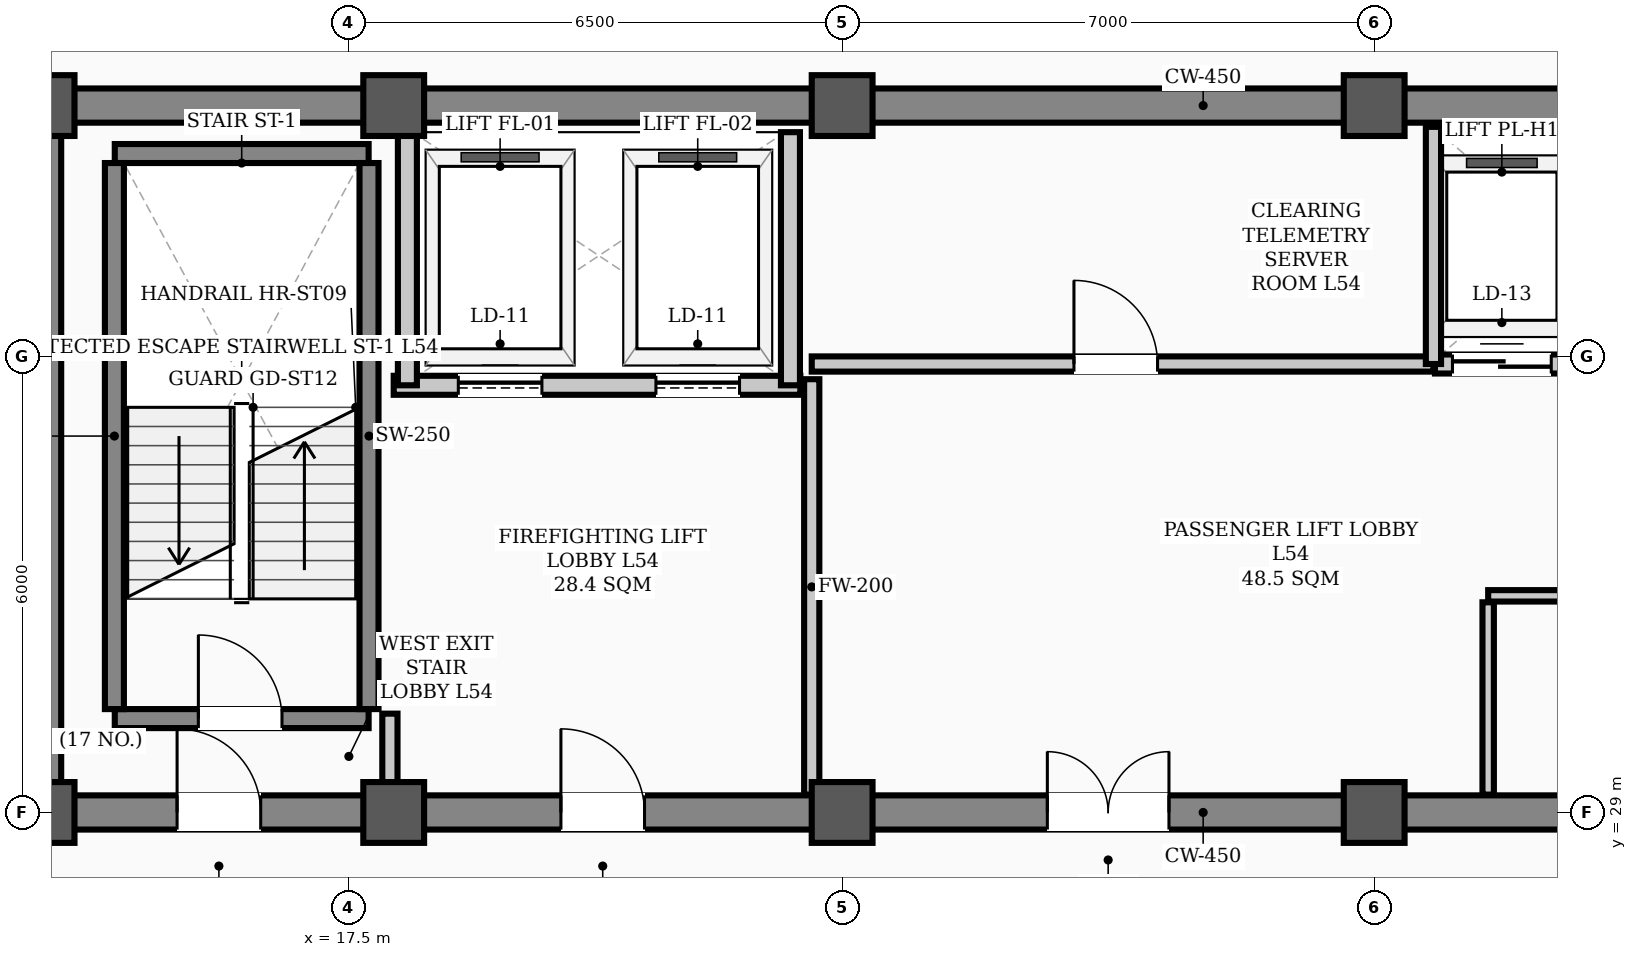
"""IFC4 building model, lengths in metres.
Left out: names, types, materials, properties, quantities, classifications, styles, units other than length and angle.
Written with IfcOpenShell. Run it as: python <this file> out.ifc"""

import sys

from ifc_helpers import new_model, si_unit, direction, frame, frame_2d, origin, origin_2d, place, context, subcontext, project, spatial, rectangle, hollow_rectangle, extrude, element, fill, save


model = new_model("IFC4")
c1 = context("Model", 3, precision=1e-05, world=origin(), true_north=direction((0.0, 1.0)))
c2 = subcontext(c1, "Body", "Model", "MODEL_VIEW")
j1 = project(units=[si_unit("LENGTHUNIT", "METRE"), si_unit("PLANEANGLEUNIT", "RADIAN")], contexts=[c1])
p1 = place(None, origin())
s1 = spatial("IfcSite", under=j1, at=p1, CompositionType="ELEMENT")
p2 = place(p1, origin())
s2 = spatial("IfcBuilding", under=s1, at=p2, CompositionType="ELEMENT")
p3 = place(p2, frame((0.0, 0.0, 218.9)))
s3 = spatial("IfcBuildingStorey", under=s2, at=p3, CompositionType="ELEMENT", Elevation=218.9)
for number, where, z_axis, x_axis in (
    (1, (13.5, 29.0, 0.0), (0.0, 0.0, 1.0), (1.0, 0.0, 0.0)),
    (2, (13.5, 38.3, 0.0), (0.0, 0.0, 1.0), (1.0, 0.0, 0.0)),
    (3, (18.1, 29.0, 0.0), (0.0, 0.0, 1.0), (1.0, 0.0, 0.0)),
    (4, (18.1, 38.3, 0.0), (0.0, 0.0, 1.0), (1.0, 0.0, 0.0)),
    (5, (24.0, 29.0, 0.0), (0.0, 0.0, 1.0), (1.0, 0.0, 0.0)),
    (6, (24.0, 38.3, 0.0), (0.0, 0.0, 1.0), (1.0, 0.0, 0.0)),
    (7, (31.0, 29.0, 0.0), (0.0, 0.0, 1.0), (1.0, 0.0, 0.0)),
    (8, (31.0, 38.3, 0.0), (0.0, 0.0, 1.0), (1.0, 0.0, 0.0)),
):
    element("IfcColumn", number, at=place(p3, frame(where, z_axis=z_axis, x_axis=x_axis)), inside=s3, PredefinedType="COLUMN", context=c2, shape_type="SweptSolid", body=[
        extrude(hollow_rectangle(XDim=0.8, YDim=0.8, WallThickness=0.032, InnerFilletRadius=0.016, OuterFilletRadius=0.048, at=origin_2d()), origin(), (0.0, 0.0, 1.0), 3.9),
    ])
p4 = place(p3, frame((13.5, 29.0, 0.0), z_axis=(0.0, 0.0, 1.0), x_axis=(1.0, 0.0, 0.0)))
e9 = element("IfcWall", 9, at=p4, inside=s3, PredefinedType="SHEAR", context=c2, shape_type="SweptSolid", body=[
    extrude(rectangle(XDim=30.5, YDim=0.45, at=frame_2d((15.25, 0.0))), origin(), (0.0, 0.0, 1.0), 3.72),
])
p5 = place(p4, frame((1.75, 0.0, 0.0)))
e10 = element("IfcOpeningElement", 10, at=p5, cuts=e9, PredefinedType="OPENING", context=c2, shape_type="SweptSolid", body=[
    extrude(rectangle(XDim=1.1, YDim=2.08, at=frame_2d((0.55, 1.04))), frame((0.0, 0.235, 0.0), z_axis=(0.0, -1.0, 0.0), x_axis=(1.0, 0.0, 0.0)), (0.0, 0.0, 1.0), 0.47),
])
p6 = place(p4, frame((26.7, 0.0, 0.0)))
e11 = element("IfcOpeningElement", 11, at=p6, cuts=e9, PredefinedType="OPENING", context=c2, shape_type="SweptSolid", body=[
    extrude(rectangle(XDim=1.1, YDim=2.08, at=frame_2d((0.55, 1.04))), frame((0.0, 0.235, 0.0), z_axis=(0.0, -1.0, 0.0), x_axis=(1.0, 0.0, 0.0)), (0.0, 0.0, 1.0), 0.47),
])
p7 = place(p4, frame((6.8, 0.0, 0.0)))
e12 = element("IfcOpeningElement", 12, at=p7, cuts=e9, PredefinedType="OPENING", context=c2, shape_type="SweptSolid", body=[
    extrude(rectangle(XDim=1.1, YDim=2.08, at=frame_2d((0.55, 1.04))), frame((0.0, 0.235, 0.0), z_axis=(0.0, -1.0, 0.0), x_axis=(1.0, 0.0, 0.0)), (0.0, 0.0, 1.0), 0.47),
])
p8 = place(p4, frame((13.2, 0.0, 0.0)))
e13 = element("IfcOpeningElement", 13, at=p8, cuts=e9, PredefinedType="OPENING", context=c2, shape_type="SweptSolid", body=[
    extrude(rectangle(XDim=1.6, YDim=2.08, at=frame_2d((0.8, 1.04))), frame((0.0, 0.235, 0.0), z_axis=(0.0, -1.0, 0.0), x_axis=(1.0, 0.0, 0.0)), (0.0, 0.0, 1.0), 0.47),
])
p9 = place(p4, frame((20.525, 0.0, 0.0)))
e14 = element("IfcOpeningElement", 14, at=p9, cuts=e9, PredefinedType="OPENING", context=c2, shape_type="SweptSolid", body=[
    extrude(rectangle(XDim=0.95, YDim=2.08, at=frame_2d((0.475, 1.04))), frame((0.0, 0.235, 0.0), z_axis=(0.0, -1.0, 0.0), x_axis=(1.0, 0.0, 0.0)), (0.0, 0.0, 1.0), 0.47),
])
p10 = place(p3, frame((13.5, 38.3, 0.0), z_axis=(0.0, 0.0, 1.0), x_axis=(1.0, 0.0, 0.0)))
e15 = element("IfcWall", 15, at=p10, inside=s3, PredefinedType="SHEAR", context=c2, shape_type="SweptSolid", body=[
    extrude(rectangle(XDim=30.5, YDim=0.45, at=frame_2d((15.25, 0.0))), origin(), (0.0, 0.0, 1.0), 3.72),
])
p11 = place(p3, frame((13.5, 29.35, 0.0), z_axis=(0.0, 0.0, 1.0), x_axis=(0.0, 1.0, 0.0)))
e16 = element("IfcWall", 16, at=p11, inside=s3, PredefinedType="SHEAR", context=c2, shape_type="SweptSolid", body=[
    extrude(rectangle(XDim=8.6, YDim=0.45, at=frame_2d((4.3, 0.0))), origin(), (0.0, 0.0, 1.0), 3.72),
])
p12 = place(p3, frame((14.43, 30.235, 0.0), z_axis=(0.0, 0.0, 1.0), x_axis=(1.0, 0.0, 0.0)))
e17 = element("IfcWall", 17, at=p12, inside=s3, PredefinedType="STANDARD", context=c2, shape_type="SweptSolid", body=[
    extrude(rectangle(XDim=3.34, YDim=0.25, at=frame_2d((1.67, 0.0))), origin(), (0.0, 0.0, 1.0), 3.72),
])
p13 = place(p12, frame((1.1, 0.0, 0.0)))
e18 = element("IfcOpeningElement", 18, at=p13, cuts=e17, PredefinedType="OPENING", context=c2, shape_type="SweptSolid", body=[
    extrude(rectangle(XDim=1.1, YDim=2.08, at=frame_2d((0.55, 1.04))), frame((0.0, 0.135, 0.0), z_axis=(0.0, -1.0, 0.0), x_axis=(1.0, 0.0, 0.0)), (0.0, 0.0, 1.0), 0.27),
])
p14 = place(p3, frame((14.43, 37.669, 0.0), z_axis=(0.0, 0.0, 1.0), x_axis=(1.0, 0.0, 0.0)))
e19 = element("IfcWall", 19, at=p14, inside=s3, PredefinedType="STANDARD", context=c2, shape_type="SweptSolid", body=[
    extrude(rectangle(XDim=3.34, YDim=0.25, at=frame_2d((1.67, 0.0))), origin(), (0.0, 0.0, 1.0), 3.72),
])
for number, where, z_axis, x_axis in (
    (20, (14.425, 30.36, 0.0), (0.0, 0.0, 1.0), (0.0, 1.0, 0.0)),
    (21, (17.775, 30.36, 0.0), (0.0, 0.0, 1.0), (0.0, 1.0, 0.0)),
):
    element("IfcWall", number, at=place(p3, frame(where, z_axis=z_axis, x_axis=x_axis)), inside=s3, PredefinedType="STANDARD", context=c2, shape_type="SweptSolid", body=[
        extrude(rectangle(XDim=7.184, YDim=0.25, at=frame_2d((3.592, 0.0))), origin(), (0.0, 0.0, 1.0), 3.72),
    ])
p15 = place(p3, frame((18.1, 34.62, 0.0), z_axis=(0.0, 0.0, 1.0), x_axis=(1.0, 0.0, 0.0)))
e22 = element("IfcWall", 22, at=p15, inside=s3, PredefinedType="STANDARD", context=c2, shape_type="SweptSolid", body=[
    extrude(rectangle(XDim=5.35, YDim=0.25, at=frame_2d((2.675, 0.0))), origin(), (0.0, 0.0, 1.0), 3.72),
])
p16 = place(p15, frame((0.85, 0.0, 0.0)))
e23 = element("IfcOpeningElement", 23, at=p16, cuts=e22, PredefinedType="OPENING", context=c2, shape_type="SweptSolid", body=[
    extrude(rectangle(XDim=1.1, YDim=2.08, at=frame_2d((0.55, 1.04))), frame((0.0, 0.135, 0.0), z_axis=(0.0, -1.0, 0.0), x_axis=(1.0, 0.0, 0.0)), (0.0, 0.0, 1.0), 0.27),
])
p17 = place(p15, frame((3.45, 0.0, 0.0)))
e24 = element("IfcOpeningElement", 24, at=p17, cuts=e22, PredefinedType="OPENING", context=c2, shape_type="SweptSolid", body=[
    extrude(rectangle(XDim=1.1, YDim=2.08, at=frame_2d((0.55, 1.04))), frame((0.0, 0.135, 0.0), z_axis=(0.0, -1.0, 0.0), x_axis=(1.0, 0.0, 0.0)), (0.0, 0.0, 1.0), 0.27),
])
for number, where, z_axis, x_axis in (
    (25, (18.28, 34.62, 0.0), (0.0, 0.0, 1.0), (0.0, 1.0, 0.0)),
    (26, (23.32, 34.62, 0.0), (0.0, 0.0, 1.0), (0.0, 1.0, 0.0)),
):
    element("IfcWall", number, at=place(p3, frame(where, z_axis=z_axis, x_axis=x_axis)), inside=s3, PredefinedType="STANDARD", context=c2, shape_type="SweptSolid", body=[
        extrude(rectangle(XDim=3.33, YDim=0.25, at=frame_2d((1.665, 0.0))), origin(), (0.0, 0.0, 1.0), 3.72),
    ])
p18 = place(p3, frame((31.8, 34.9, 0.0), z_axis=(0.0, 0.0, 1.0), x_axis=(1.0, 0.0, 0.0)))
e27 = element("IfcWall", 27, at=p18, inside=s3, PredefinedType="STANDARD", context=c2, shape_type="SweptSolid", body=[
    extrude(rectangle(XDim=3.6, YDim=0.25, at=frame_2d((1.8, 0.0))), origin(), (0.0, 0.0, 1.0), 3.72),
])
p19 = place(p18, frame((0.23, 0.0, 0.0)))
e28 = element("IfcOpeningElement", 28, at=p19, cuts=e27, PredefinedType="OPENING", context=c2, shape_type="SweptSolid", body=[
    extrude(rectangle(XDim=1.3, YDim=2.08, at=frame_2d((0.65, 1.04))), frame((0.0, 0.135, 0.0), z_axis=(0.0, -1.0, 0.0), x_axis=(1.0, 0.0, 0.0)), (0.0, 0.0, 1.0), 0.27),
])
p20 = place(p18, frame((2.03, 0.0, 0.0)))
e29 = element("IfcOpeningElement", 29, at=p20, cuts=e27, PredefinedType="OPENING", context=c2, shape_type="SweptSolid", body=[
    extrude(rectangle(XDim=1.3, YDim=2.08, at=frame_2d((0.65, 1.04))), frame((0.0, 0.135, 0.0), z_axis=(0.0, -1.0, 0.0), x_axis=(1.0, 0.0, 0.0)), (0.0, 0.0, 1.0), 0.27),
])
p21 = place(p3, frame((23.6, 34.9, 0.0), z_axis=(0.0, 0.0, 1.0), x_axis=(1.0, 0.0, 0.0)))
e30 = element("IfcWall", 30, at=p21, inside=s3, PredefinedType="STANDARD", context=c2, shape_type="SweptSolid", body=[
    extrude(rectangle(XDim=8.18, YDim=0.2, at=frame_2d((4.09, 0.0))), origin(), (0.0, 0.0, 1.0), 3.72),
])
p22 = place(p21, frame((3.45, 0.0, 0.0)))
e31 = element("IfcOpeningElement", 31, at=p22, cuts=e30, PredefinedType="OPENING", context=c2, shape_type="SweptSolid", body=[
    extrude(rectangle(XDim=1.1, YDim=2.08, at=frame_2d((0.55, 1.04))), frame((0.0, 0.11, 0.0), z_axis=(0.0, -1.0, 0.0), x_axis=(1.0, 0.0, 0.0)), (0.0, 0.0, 1.0), 0.22),
])
p23 = place(p3, frame((32.5, 31.85, 0.0), z_axis=(0.0, 0.0, 1.0), x_axis=(1.0, 0.0, 0.0)))
e32 = element("IfcWall", 32, at=p23, inside=s3, PredefinedType="PARTITIONING", context=c2, shape_type="SweptSolid", body=[
    extrude(rectangle(XDim=4.1, YDim=0.15, at=frame_2d((2.05, 0.0))), origin(), (0.0, 0.0, 1.0), 3.72),
])
p24 = place(p3, frame((18.05, 29.235, 0.0), z_axis=(0.0, 0.0, 1.0), x_axis=(0.0, 1.0, 0.0)))
e33 = element("IfcWall", 33, at=p24, inside=s3, PredefinedType="STANDARD", context=c2, shape_type="SweptSolid", body=[
    extrude(rectangle(XDim=1.065, YDim=0.2, at=frame_2d((0.532, 0.0))), origin(), (0.0, 0.0, 1.0), 3.35),
])
p25 = place(p3, frame((23.6, 29.235, 0.0), z_axis=(0.0, 0.0, 1.0), x_axis=(0.0, 1.0, 0.0)))
e34 = element("IfcWall", 34, at=p25, inside=s3, PredefinedType="STANDARD", context=c2, shape_type="SweptSolid", body=[
    extrude(rectangle(XDim=5.465, YDim=0.2, at=frame_2d((2.732, 0.0))), origin(), (0.0, 0.0, 1.0), 3.2),
])
p26 = place(p3, frame((32.5, 29.235, 0.0), z_axis=(0.0, 0.0, 1.0), x_axis=(0.0, 1.0, 0.0)))
e35 = element("IfcWall", 35, at=p26, inside=s3, PredefinedType="PARTITIONING", context=c2, shape_type="SweptSolid", body=[
    extrude(rectangle(XDim=2.53, YDim=0.15, at=frame_2d((1.265, 0.0))), origin(), (0.0, 0.0, 1.0), 3.35),
])
p27 = place(p3, frame((31.78, 34.9, 0.0), z_axis=(0.0, 0.0, 1.0), x_axis=(0.0, 1.0, 0.0)))
e36 = element("IfcWall", 36, at=p27, inside=s3, PredefinedType="STANDARD", context=c2, shape_type="SweptSolid", body=[
    extrude(rectangle(XDim=3.12, YDim=0.2, at=frame_2d((1.56, 0.0))), origin(), (0.0, 0.0, 1.0), 3.72),
])
p28 = place(p13, origin())
e37 = element("IfcDoor", 37, at=p28, inside=s3, OperationType="SINGLE_SWING_LEFT", PredefinedType="DOOR", context=c2, shape_type="SweptSolid", body=[
    extrude(rectangle(XDim=1.1, YDim=2.08, at=frame_2d((0.55, 1.04))), frame((0.0, 0.025, 0.0), z_axis=(0.0, -1.0, 0.0), x_axis=(1.0, 0.0, 0.0)), (0.0, 0.0, 1.0), 0.05),
])
fill(e18, e37)
p29 = place(p5, origin())
e38 = element("IfcDoor", 38, at=p29, inside=s3, OperationType="SINGLE_SWING_LEFT", PredefinedType="DOOR", context=c2, shape_type="SweptSolid", body=[
    extrude(rectangle(XDim=1.1, YDim=2.08, at=frame_2d((0.55, 1.04))), frame((0.0, 0.025, 0.0), z_axis=(0.0, -1.0, 0.0), x_axis=(1.0, 0.0, 0.0)), (0.0, 0.0, 1.0), 0.05),
])
fill(e10, e38)
p30 = place(p7, origin())
e39 = element("IfcDoor", 39, at=p30, inside=s3, OperationType="SINGLE_SWING_LEFT", PredefinedType="DOOR", context=c2, shape_type="SweptSolid", body=[
    extrude(rectangle(XDim=1.1, YDim=2.08, at=frame_2d((0.55, 1.04))), frame((0.0, 0.025, 0.0), z_axis=(0.0, -1.0, 0.0), x_axis=(1.0, 0.0, 0.0)), (0.0, 0.0, 1.0), 0.05),
])
fill(e12, e39)
p31 = place(p8, origin())
e40 = element("IfcDoor", 40, at=p31, inside=s3, OperationType="DOUBLE_DOOR_SINGLE_SWING", PredefinedType="DOOR", context=c2, shape_type="SweptSolid", body=[
    extrude(rectangle(XDim=1.6, YDim=2.08, at=frame_2d((0.8, 1.04))), frame((0.0, 0.025, 0.0), z_axis=(0.0, -1.0, 0.0), x_axis=(1.0, 0.0, 0.0)), (0.0, 0.0, 1.0), 0.05),
])
fill(e13, e40)
p32 = place(p22, origin())
e41 = element("IfcDoor", 41, at=p32, inside=s3, OperationType="SINGLE_SWING_LEFT", PredefinedType="DOOR", context=c2, shape_type="SweptSolid", body=[
    extrude(rectangle(XDim=1.1, YDim=2.08, at=frame_2d((0.55, 1.04))), frame((0.0, 0.025, 0.0), z_axis=(0.0, -1.0, 0.0), x_axis=(1.0, 0.0, 0.0)), (0.0, 0.0, 1.0), 0.05),
])
fill(e31, e41)
p33 = place(p16, origin())
e42 = element("IfcDoor", 42, at=p33, inside=s3, OperationType="SLIDING_TO_LEFT", PredefinedType="DOOR", context=c2, shape_type="SweptSolid", body=[
    extrude(rectangle(XDim=1.1, YDim=2.08, at=frame_2d((0.55, 1.04))), frame((0.0, 0.025, 0.0), z_axis=(0.0, -1.0, 0.0), x_axis=(1.0, 0.0, 0.0)), (0.0, 0.0, 1.0), 0.05),
])
fill(e23, e42)
p34 = place(p17, origin())
e43 = element("IfcDoor", 43, at=p34, inside=s3, OperationType="SLIDING_TO_LEFT", PredefinedType="DOOR", context=c2, shape_type="SweptSolid", body=[
    extrude(rectangle(XDim=1.1, YDim=2.08, at=frame_2d((0.55, 1.04))), frame((0.0, 0.025, 0.0), z_axis=(0.0, -1.0, 0.0), x_axis=(1.0, 0.0, 0.0)), (0.0, 0.0, 1.0), 0.05),
])
fill(e24, e43)
p35 = place(p19, origin())
e44 = element("IfcDoor", 44, at=p35, inside=s3, OperationType="DOUBLE_DOOR_SLIDING", PredefinedType="DOOR", context=c2, shape_type="SweptSolid", body=[
    extrude(rectangle(XDim=1.3, YDim=2.08, at=frame_2d((0.65, 1.04))), frame((0.0, 0.025, 0.0), z_axis=(0.0, -1.0, 0.0), x_axis=(1.0, 0.0, 0.0)), (0.0, 0.0, 1.0), 0.05),
])
fill(e28, e44)
save(model, sys.argv[1])
